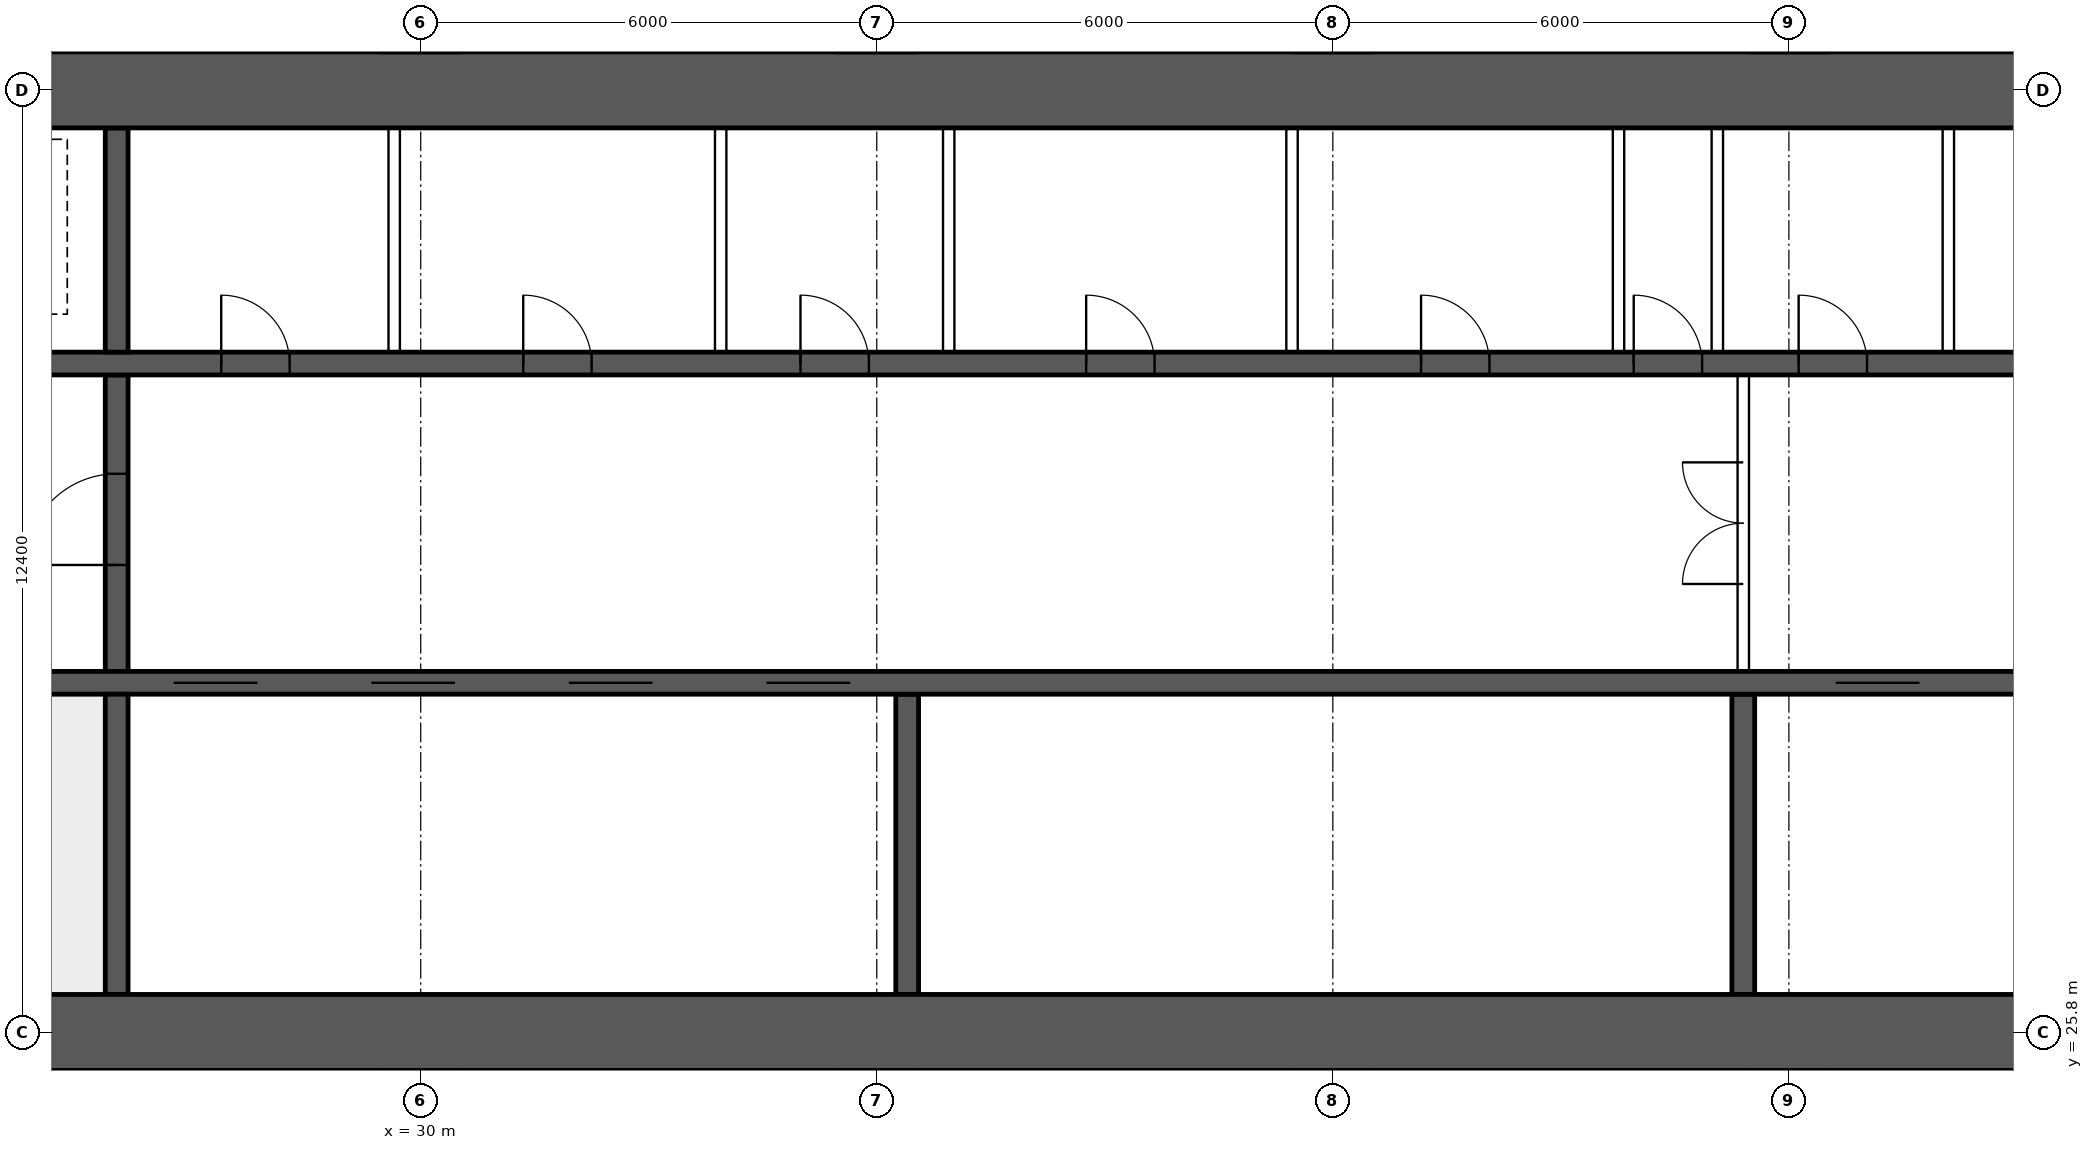
"""IFC4 building model, lengths in metres.
Left out: names, types, materials, properties, quantities, classifications, styles, units other than length and angle.
Written with IfcOpenShell. Run it as: python <this file> out.ifc"""

import sys

from ifc_helpers import new_model, si_unit, direction, frame, frame_2d, origin, place, context, subcontext, project, spatial, rectangle, extrude, element, fill, save


model = new_model("IFC4")
c1 = context("Model", 3, precision=1e-05, world=origin(), true_north=direction((0.0, 1.0)))
c2 = subcontext(c1, "Body", "Model", "MODEL_VIEW")
j1 = project(units=[si_unit("LENGTHUNIT", "METRE"), si_unit("PLANEANGLEUNIT", "RADIAN")], contexts=[c1])
p1 = place(None, origin())
s1 = spatial("IfcSite", under=j1, at=p1, CompositionType="ELEMENT")
p2 = place(p1, origin())
s2 = spatial("IfcBuilding", under=s1, at=p2, CompositionType="ELEMENT")
p3 = place(p2, frame((0.0, 0.0, 50.2)))
s3 = spatial("IfcBuildingStorey", under=s2, at=p3, CompositionType="ELEMENT", Elevation=50.2)
for number, where, z_axis, x_axis in (
    (1, (18.0, 25.8, 0.0), (0.0, 0.0, 1.0), (1.0, 0.0, 0.0)),
    (2, (18.0, 38.2, 0.0), (0.0, 0.0, 1.0), (1.0, 0.0, 0.0)),
):
    element("IfcWall", number, at=place(p3, frame(where, z_axis=z_axis, x_axis=x_axis)), inside=s3, PredefinedType="SHEAR", context=c2, shape_type="SweptSolid", body=[
        extrude(rectangle(XDim=48.0, YDim=1.0, at=frame_2d((24.0, 0.0))), origin(), (0.0, 0.0, 1.0), 3.75),
    ])
p4 = place(p3, frame((18.5, 30.4, 0.0), z_axis=(0.0, 0.0, 1.0), x_axis=(1.0, 0.0, 0.0)))
e3 = element("IfcWall", 3, at=p4, inside=s3, PredefinedType="SHEAR", context=c2, shape_type="SweptSolid", body=[
    extrude(rectangle(XDim=47.0, YDim=0.3, at=frame_2d((23.5, 0.0))), origin(), (0.0, 0.0, 1.0), 3.75),
])
p5 = place(p4, frame((0.4, 0.0, 0.0)))
e4 = element("IfcOpeningElement", 4, at=p5, cuts=e3, PredefinedType="OPENING", context=c2, shape_type="SweptSolid", body=[
    extrude(rectangle(XDim=1.0, YDim=2.1, at=frame_2d((0.5, 1.05))), frame((0.0, 0.16, 0.0), z_axis=(0.0, -1.0, 0.0), x_axis=(1.0, 0.0, 0.0)), (0.0, 0.0, 1.0), 0.32),
])
p6 = place(p4, frame((45.6, 0.0, 0.0)))
e5 = element("IfcOpeningElement", 5, at=p6, cuts=e3, PredefinedType="OPENING", context=c2, shape_type="SweptSolid", body=[
    extrude(rectangle(XDim=1.0, YDim=2.1, at=frame_2d((0.5, 1.05))), frame((0.0, 0.16, 0.0), z_axis=(0.0, -1.0, 0.0), x_axis=(1.0, 0.0, 0.0)), (0.0, 0.0, 1.0), 0.32),
])
p7 = place(p4, frame((8.25, 0.0, 0.0)))
e6 = element("IfcOpeningElement", 6, at=p7, cuts=e3, PredefinedType="OPENING", context=c2, shape_type="SweptSolid", body=[
    extrude(rectangle(XDim=1.1, YDim=2.1, at=frame_2d((0.55, 1.05))), frame((0.0, 0.16, 0.0), z_axis=(0.0, -1.0, 0.0), x_axis=(1.0, 0.0, 0.0)), (0.0, 0.0, 1.0), 0.32),
])
p8 = place(p4, frame((10.85, 0.0, 0.0)))
e7 = element("IfcOpeningElement", 7, at=p8, cuts=e3, PredefinedType="OPENING", context=c2, shape_type="SweptSolid", body=[
    extrude(rectangle(XDim=1.1, YDim=2.1, at=frame_2d((0.55, 1.05))), frame((0.0, 0.16, 0.0), z_axis=(0.0, -1.0, 0.0), x_axis=(1.0, 0.0, 0.0)), (0.0, 0.0, 1.0), 0.32),
])
p9 = place(p4, frame((13.45, 0.0, 0.0)))
e8 = element("IfcOpeningElement", 8, at=p9, cuts=e3, PredefinedType="OPENING", context=c2, shape_type="SweptSolid", body=[
    extrude(rectangle(XDim=1.1, YDim=2.1, at=frame_2d((0.55, 1.05))), frame((0.0, 0.16, 0.0), z_axis=(0.0, -1.0, 0.0), x_axis=(1.0, 0.0, 0.0)), (0.0, 0.0, 1.0), 0.32),
])
p10 = place(p4, frame((16.05, 0.0, 0.0)))
e9 = element("IfcOpeningElement", 9, at=p10, cuts=e3, PredefinedType="OPENING", context=c2, shape_type="SweptSolid", body=[
    extrude(rectangle(XDim=1.1, YDim=2.1, at=frame_2d((0.55, 1.05))), frame((0.0, 0.16, 0.0), z_axis=(0.0, -1.0, 0.0), x_axis=(1.0, 0.0, 0.0)), (0.0, 0.0, 1.0), 0.32),
])
p11 = place(p4, frame((30.117, 0.0, 0.0)))
e10 = element("IfcOpeningElement", 10, at=p11, cuts=e3, PredefinedType="OPENING", context=c2, shape_type="SweptSolid", body=[
    extrude(rectangle(XDim=1.1, YDim=2.1, at=frame_2d((0.55, 1.05))), frame((0.0, 0.16, 0.0), z_axis=(0.0, -1.0, 0.0), x_axis=(1.0, 0.0, 0.0)), (0.0, 0.0, 1.0), 0.32),
])
p12 = place(p4, frame((33.65, 0.0, 0.0)))
e11 = element("IfcOpeningElement", 11, at=p12, cuts=e3, PredefinedType="OPENING", context=c2, shape_type="SweptSolid", body=[
    extrude(rectangle(XDim=1.1, YDim=2.1, at=frame_2d((0.55, 1.05))), frame((0.0, 0.16, 0.0), z_axis=(0.0, -1.0, 0.0), x_axis=(1.0, 0.0, 0.0)), (0.0, 0.0, 1.0), 0.32),
])
p13 = place(p4, frame((37.183, 0.0, 0.0)))
e12 = element("IfcOpeningElement", 12, at=p13, cuts=e3, PredefinedType="OPENING", context=c2, shape_type="SweptSolid", body=[
    extrude(rectangle(XDim=1.1, YDim=2.1, at=frame_2d((0.55, 1.05))), frame((0.0, 0.16, 0.0), z_axis=(0.0, -1.0, 0.0), x_axis=(1.0, 0.0, 0.0)), (0.0, 0.0, 1.0), 0.32),
])
p14 = place(p3, frame((18.5, 34.6, 0.0), z_axis=(0.0, 0.0, 1.0), x_axis=(1.0, 0.0, 0.0)))
e13 = element("IfcWall", 13, at=p14, inside=s3, PredefinedType="SHEAR", context=c2, shape_type="SweptSolid", body=[
    extrude(rectangle(XDim=47.0, YDim=0.3, at=frame_2d((23.5, 0.0))), origin(), (0.0, 0.0, 1.0), 3.75),
])
p15 = place(p14, frame((0.9, 0.0, 0.0)))
e14 = element("IfcOpeningElement", 14, at=p15, cuts=e13, PredefinedType="OPENING", context=c2, shape_type="SweptSolid", body=[
    extrude(rectangle(XDim=1.1, YDim=2.1, at=frame_2d((0.55, 1.05))), frame((0.0, 0.16, 0.0), z_axis=(0.0, -1.0, 0.0), x_axis=(1.0, 0.0, 0.0)), (0.0, 0.0, 1.0), 0.32),
])
p16 = place(p14, frame((45.0, 0.0, 0.0)))
e15 = element("IfcOpeningElement", 15, at=p16, cuts=e13, PredefinedType="OPENING", context=c2, shape_type="SweptSolid", body=[
    extrude(rectangle(XDim=1.1, YDim=2.1, at=frame_2d((0.55, 1.05))), frame((0.0, 0.16, 0.0), z_axis=(0.0, -1.0, 0.0), x_axis=(1.0, 0.0, 0.0)), (0.0, 0.0, 1.0), 0.32),
])
p17 = place(p14, frame((4.1, 0.0, 0.0)))
e16 = element("IfcOpeningElement", 16, at=p17, cuts=e13, PredefinedType="OPENING", context=c2, shape_type="SweptSolid", body=[
    extrude(rectangle(XDim=0.9, YDim=2.1, at=frame_2d((0.45, 1.05))), frame((0.0, 0.16, 0.0), z_axis=(0.0, -1.0, 0.0), x_axis=(1.0, 0.0, 0.0)), (0.0, 0.0, 1.0), 0.32),
])
p18 = place(p14, frame((42.0, 0.0, 0.0)))
e17 = element("IfcOpeningElement", 17, at=p18, cuts=e13, PredefinedType="OPENING", context=c2, shape_type="SweptSolid", body=[
    extrude(rectangle(XDim=0.9, YDim=2.1, at=frame_2d((0.45, 1.05))), frame((0.0, 0.16, 0.0), z_axis=(0.0, -1.0, 0.0), x_axis=(1.0, 0.0, 0.0)), (0.0, 0.0, 1.0), 0.32),
])
p19 = place(p14, frame((8.875, 0.0, 0.0)))
e18 = element("IfcOpeningElement", 18, at=p19, cuts=e13, PredefinedType="OPENING", context=c2, shape_type="SweptSolid", body=[
    extrude(rectangle(XDim=0.9, YDim=2.1, at=frame_2d((0.45, 1.05))), frame((0.0, 0.16, 0.0), z_axis=(0.0, -1.0, 0.0), x_axis=(1.0, 0.0, 0.0)), (0.0, 0.0, 1.0), 0.32),
])
p20 = place(p14, frame((12.849, 0.0, 0.0)))
e19 = element("IfcOpeningElement", 19, at=p20, cuts=e13, PredefinedType="OPENING", context=c2, shape_type="SweptSolid", body=[
    extrude(rectangle(XDim=0.9, YDim=2.1, at=frame_2d((0.45, 1.05))), frame((0.0, 0.16, 0.0), z_axis=(0.0, -1.0, 0.0), x_axis=(1.0, 0.0, 0.0)), (0.0, 0.0, 1.0), 0.32),
])
p21 = place(p14, frame((16.496, 0.0, 0.0)))
e20 = element("IfcOpeningElement", 20, at=p21, cuts=e13, PredefinedType="OPENING", context=c2, shape_type="SweptSolid", body=[
    extrude(rectangle(XDim=0.9, YDim=2.1, at=frame_2d((0.45, 1.05))), frame((0.0, 0.16, 0.0), z_axis=(0.0, -1.0, 0.0), x_axis=(1.0, 0.0, 0.0)), (0.0, 0.0, 1.0), 0.32),
])
p22 = place(p14, frame((20.255, 0.0, 0.0)))
e21 = element("IfcOpeningElement", 21, at=p22, cuts=e13, PredefinedType="OPENING", context=c2, shape_type="SweptSolid", body=[
    extrude(rectangle(XDim=0.9, YDim=2.1, at=frame_2d((0.45, 1.05))), frame((0.0, 0.16, 0.0), z_axis=(0.0, -1.0, 0.0), x_axis=(1.0, 0.0, 0.0)), (0.0, 0.0, 1.0), 0.32),
])
p23 = place(p14, frame((24.661, 0.0, 0.0)))
e22 = element("IfcOpeningElement", 22, at=p23, cuts=e13, PredefinedType="OPENING", context=c2, shape_type="SweptSolid", body=[
    extrude(rectangle(XDim=0.9, YDim=2.1, at=frame_2d((0.45, 1.05))), frame((0.0, 0.16, 0.0), z_axis=(0.0, -1.0, 0.0), x_axis=(1.0, 0.0, 0.0)), (0.0, 0.0, 1.0), 0.32),
])
p24 = place(p14, frame((27.458, 0.0, 0.0)))
e23 = element("IfcOpeningElement", 23, at=p24, cuts=e13, PredefinedType="OPENING", context=c2, shape_type="SweptSolid", body=[
    extrude(rectangle(XDim=0.9, YDim=2.1, at=frame_2d((0.45, 1.05))), frame((0.0, 0.16, 0.0), z_axis=(0.0, -1.0, 0.0), x_axis=(1.0, 0.0, 0.0)), (0.0, 0.0, 1.0), 0.32),
])
p25 = place(p14, frame((29.628, 0.0, 0.0)))
e24 = element("IfcOpeningElement", 24, at=p25, cuts=e13, PredefinedType="OPENING", context=c2, shape_type="SweptSolid", body=[
    extrude(rectangle(XDim=0.9, YDim=2.1, at=frame_2d((0.45, 1.05))), frame((0.0, 0.16, 0.0), z_axis=(0.0, -1.0, 0.0), x_axis=(1.0, 0.0, 0.0)), (0.0, 0.0, 1.0), 0.32),
])
p26 = place(p14, frame((33.427, 0.0, 0.0)))
e25 = element("IfcOpeningElement", 25, at=p26, cuts=e13, PredefinedType="OPENING", context=c2, shape_type="SweptSolid", body=[
    extrude(rectangle(XDim=0.9, YDim=2.1, at=frame_2d((0.45, 1.05))), frame((0.0, 0.16, 0.0), z_axis=(0.0, -1.0, 0.0), x_axis=(1.0, 0.0, 0.0)), (0.0, 0.0, 1.0), 0.32),
])
p27 = place(p14, frame((37.378, 0.0, 0.0)))
e26 = element("IfcOpeningElement", 26, at=p27, cuts=e13, PredefinedType="OPENING", context=c2, shape_type="SweptSolid", body=[
    extrude(rectangle(XDim=0.9, YDim=2.1, at=frame_2d((0.45, 1.05))), frame((0.0, 0.16, 0.0), z_axis=(0.0, -1.0, 0.0), x_axis=(1.0, 0.0, 0.0)), (0.0, 0.0, 1.0), 0.32),
])
p28 = place(p3, frame((26.0, 26.3, 0.0), z_axis=(0.0, 0.0, 1.0), x_axis=(0.0, 1.0, 0.0)))
e27 = element("IfcWall", 27, at=p28, inside=s3, PredefinedType="SHEAR", context=c2, shape_type="SweptSolid", body=[
    extrude(rectangle(XDim=3.95, YDim=0.3, at=frame_2d((1.975, 0.0))), origin(), (0.0, 0.0, 1.0), 3.75),
])
p29 = place(p3, frame((26.0, 30.55, 0.0), z_axis=(0.0, 0.0, 1.0), x_axis=(0.0, 1.0, 0.0)))
e28 = element("IfcWall", 28, at=p29, inside=s3, PredefinedType="SHEAR", context=c2, shape_type="SweptSolid", body=[
    extrude(rectangle(XDim=3.9, YDim=0.3, at=frame_2d((1.95, 0.0))), origin(), (0.0, 0.0, 1.0), 3.75),
])
p30 = place(p29, frame((1.4, 0.0, 0.0)))
e29 = element("IfcOpeningElement", 29, at=p30, cuts=e28, PredefinedType="OPENING", context=c2, shape_type="SweptSolid", body=[
    extrude(rectangle(XDim=1.2, YDim=2.1, at=frame_2d((0.6, 1.05))), frame((0.0, 0.16, 0.0), z_axis=(0.0, -1.0, 0.0), x_axis=(1.0, 0.0, 0.0)), (0.0, 0.0, 1.0), 0.32),
])
p31 = place(p3, frame((26.0, 34.75, 0.0), z_axis=(0.0, 0.0, 1.0), x_axis=(0.0, 1.0, 0.0)))
e30 = element("IfcWall", 30, at=p31, inside=s3, PredefinedType="SHEAR", context=c2, shape_type="SweptSolid", body=[
    extrude(rectangle(XDim=2.95, YDim=0.3, at=frame_2d((1.475, 0.0))), origin(), (0.0, 0.0, 1.0), 3.75),
])
for number, where, z_axis, x_axis in (
    (31, (36.4, 26.3, 0.0), (0.0, 0.0, 1.0), (0.0, 1.0, 0.0)),
    (32, (47.4, 26.3, 0.0), (0.0, 0.0, 1.0), (0.0, 1.0, 0.0)),
):
    element("IfcWall", number, at=place(p3, frame(where, z_axis=z_axis, x_axis=x_axis)), inside=s3, PredefinedType="SHEAR", context=c2, shape_type="SweptSolid", body=[
        extrude(rectangle(XDim=3.95, YDim=0.3, at=frame_2d((1.975, 0.0))), origin(), (0.0, 0.0, 1.0), 3.75),
    ])
p32 = place(p3, frame((47.4, 30.55, 0.0), z_axis=(0.0, 0.0, 1.0), x_axis=(0.0, 1.0, 0.0)))
e33 = element("IfcWall", 33, at=p32, inside=s3, PredefinedType="SOLIDWALL", context=c2, shape_type="SweptSolid", body=[
    extrude(rectangle(XDim=3.9, YDim=0.15, at=frame_2d((1.95, 0.0))), origin(), (0.0, 0.0, 1.0), 3.3),
])
p33 = place(p32, frame((1.15, 0.0, 0.0)))
e34 = element("IfcOpeningElement", 34, at=p33, cuts=e33, PredefinedType="OPENING", context=c2, shape_type="SweptSolid", body=[
    extrude(rectangle(XDim=1.6, YDim=2.1, at=frame_2d((0.8, 1.05))), frame((0.0, 0.085, 0.0), z_axis=(0.0, -1.0, 0.0), x_axis=(1.0, 0.0, 0.0)), (0.0, 0.0, 1.0), 0.17),
])
for number, where, z_axis, x_axis in (
    (35, (29.651, 34.75, 0.0), (0.0, 0.0, 1.0), (0.0, 1.0, 0.0)),
    (36, (33.946, 34.75, 0.0), (0.0, 0.0, 1.0), (0.0, 1.0, 0.0)),
    (37, (36.946, 34.75, 0.0), (0.0, 0.0, 1.0), (0.0, 1.0, 0.0)),
    (38, (41.463, 34.75, 0.0), (0.0, 0.0, 1.0), (0.0, 1.0, 0.0)),
    (39, (45.758, 34.75, 0.0), (0.0, 0.0, 1.0), (0.0, 1.0, 0.0)),
    (40, (47.058, 34.75, 0.0), (0.0, 0.0, 1.0), (0.0, 1.0, 0.0)),
    (41, (50.098, 34.75, 0.0), (0.0, 0.0, 1.0), (0.0, 1.0, 0.0)),
):
    element("IfcWall", number, at=place(p3, frame(where, z_axis=z_axis, x_axis=x_axis)), inside=s3, PredefinedType="SOLIDWALL", context=c2, shape_type="SweptSolid", body=[
        extrude(rectangle(XDim=2.95, YDim=0.15, at=frame_2d((1.475, 0.0))), origin(), (0.0, 0.0, 1.0), 3.3),
    ])
for number, where, z_axis, x_axis in (
    (42, (26.815, 14.9, 0.0), (0.0, 0.0, 1.0), (0.0, 1.0, 0.0)),
    (43, (32.83, 14.9, 0.0), (0.0, 0.0, 1.0), (0.0, 1.0, 0.0)),
    (44, (39.31, 14.9, 0.0), (0.0, 0.0, 1.0), (0.0, 1.0, 0.0)),
    (45, (45.48, 14.9, 0.0), (0.0, 0.0, 1.0), (0.0, 1.0, 0.0)),
):
    element("IfcWall", number, at=place(p3, frame(where, z_axis=z_axis, x_axis=x_axis)), inside=s3, PredefinedType="PARTITIONING", context=c2, shape_type="SweptSolid", body=[
        extrude(rectangle(XDim=10.4, YDim=0.15, at=frame_2d((5.2, 0.0))), origin(), (0.0, 0.0, 1.0), 3.3),
    ])
p34 = place(p33, origin())
e46 = element("IfcDoor", 46, at=p34, inside=s3, OperationType="DOUBLE_DOOR_SINGLE_SWING", PredefinedType="DOOR", context=c2, shape_type="SweptSolid", body=[
    extrude(rectangle(XDim=1.6, YDim=2.1, at=frame_2d((0.8, 1.05))), frame((0.0, 0.025, 0.0), z_axis=(0.0, -1.0, 0.0), x_axis=(1.0, 0.0, 0.0)), (0.0, 0.0, 1.0), 0.05),
])
fill(e34, e46)
p35 = place(p30, origin())
e47 = element("IfcDoor", 47, at=p35, inside=s3, OperationType="SINGLE_SWING_LEFT", PredefinedType="DOOR", context=c2, shape_type="SweptSolid", body=[
    extrude(rectangle(XDim=1.2, YDim=2.1, at=frame_2d((0.6, 1.05))), frame((0.0, 0.025, 0.0), z_axis=(0.0, -1.0, 0.0), x_axis=(1.0, 0.0, 0.0)), (0.0, 0.0, 1.0), 0.05),
])
fill(e29, e47)
p36 = place(p19, origin())
e48 = element("IfcDoor", 48, at=p36, inside=s3, OperationType="SINGLE_SWING_LEFT", PredefinedType="DOOR", context=c2, shape_type="SweptSolid", body=[
    extrude(rectangle(XDim=0.9, YDim=2.1, at=frame_2d((0.45, 1.05))), frame((0.0, 0.025, 0.0), z_axis=(0.0, -1.0, 0.0), x_axis=(1.0, 0.0, 0.0)), (0.0, 0.0, 1.0), 0.05),
])
fill(e18, e48)
p37 = place(p20, origin())
e49 = element("IfcDoor", 49, at=p37, inside=s3, OperationType="SINGLE_SWING_LEFT", PredefinedType="DOOR", context=c2, shape_type="SweptSolid", body=[
    extrude(rectangle(XDim=0.9, YDim=2.1, at=frame_2d((0.45, 1.05))), frame((0.0, 0.025, 0.0), z_axis=(0.0, -1.0, 0.0), x_axis=(1.0, 0.0, 0.0)), (0.0, 0.0, 1.0), 0.05),
])
fill(e19, e49)
p38 = place(p21, origin())
e50 = element("IfcDoor", 50, at=p38, inside=s3, OperationType="SINGLE_SWING_LEFT", PredefinedType="DOOR", context=c2, shape_type="SweptSolid", body=[
    extrude(rectangle(XDim=0.9, YDim=2.1, at=frame_2d((0.45, 1.05))), frame((0.0, 0.025, 0.0), z_axis=(0.0, -1.0, 0.0), x_axis=(1.0, 0.0, 0.0)), (0.0, 0.0, 1.0), 0.05),
])
fill(e20, e50)
p39 = place(p22, origin())
e51 = element("IfcDoor", 51, at=p39, inside=s3, OperationType="SINGLE_SWING_LEFT", PredefinedType="DOOR", context=c2, shape_type="SweptSolid", body=[
    extrude(rectangle(XDim=0.9, YDim=2.1, at=frame_2d((0.45, 1.05))), frame((0.0, 0.025, 0.0), z_axis=(0.0, -1.0, 0.0), x_axis=(1.0, 0.0, 0.0)), (0.0, 0.0, 1.0), 0.05),
])
fill(e21, e51)
p40 = place(p23, origin())
e52 = element("IfcDoor", 52, at=p40, inside=s3, OperationType="SINGLE_SWING_LEFT", PredefinedType="DOOR", context=c2, shape_type="SweptSolid", body=[
    extrude(rectangle(XDim=0.9, YDim=2.1, at=frame_2d((0.45, 1.05))), frame((0.0, 0.025, 0.0), z_axis=(0.0, -1.0, 0.0), x_axis=(1.0, 0.0, 0.0)), (0.0, 0.0, 1.0), 0.05),
])
fill(e22, e52)
p41 = place(p24, origin())
e53 = element("IfcDoor", 53, at=p41, inside=s3, OperationType="SINGLE_SWING_LEFT", PredefinedType="DOOR", context=c2, shape_type="SweptSolid", body=[
    extrude(rectangle(XDim=0.9, YDim=2.1, at=frame_2d((0.45, 1.05))), frame((0.0, 0.025, 0.0), z_axis=(0.0, -1.0, 0.0), x_axis=(1.0, 0.0, 0.0)), (0.0, 0.0, 1.0), 0.05),
])
fill(e23, e53)
p42 = place(p25, origin())
e54 = element("IfcDoor", 54, at=p42, inside=s3, OperationType="SINGLE_SWING_LEFT", PredefinedType="DOOR", context=c2, shape_type="SweptSolid", body=[
    extrude(rectangle(XDim=0.9, YDim=2.1, at=frame_2d((0.45, 1.05))), frame((0.0, 0.025, 0.0), z_axis=(0.0, -1.0, 0.0), x_axis=(1.0, 0.0, 0.0)), (0.0, 0.0, 1.0), 0.05),
])
fill(e24, e54)
p43 = place(p7, origin())
e55 = element("IfcDoor", 55, at=p43, inside=s3, OperationType="DOUBLE_DOOR_SLIDING", PredefinedType="DOOR", context=c2, shape_type="SweptSolid", body=[
    extrude(rectangle(XDim=1.1, YDim=2.1, at=frame_2d((0.55, 1.05))), frame((0.0, 0.025, 0.0), z_axis=(0.0, -1.0, 0.0), x_axis=(1.0, 0.0, 0.0)), (0.0, 0.0, 1.0), 0.05),
])
fill(e6, e55)
p44 = place(p8, origin())
e56 = element("IfcDoor", 56, at=p44, inside=s3, OperationType="DOUBLE_DOOR_SLIDING", PredefinedType="DOOR", context=c2, shape_type="SweptSolid", body=[
    extrude(rectangle(XDim=1.1, YDim=2.1, at=frame_2d((0.55, 1.05))), frame((0.0, 0.025, 0.0), z_axis=(0.0, -1.0, 0.0), x_axis=(1.0, 0.0, 0.0)), (0.0, 0.0, 1.0), 0.05),
])
fill(e7, e56)
p45 = place(p9, origin())
e57 = element("IfcDoor", 57, at=p45, inside=s3, OperationType="DOUBLE_DOOR_SLIDING", PredefinedType="DOOR", context=c2, shape_type="SweptSolid", body=[
    extrude(rectangle(XDim=1.1, YDim=2.1, at=frame_2d((0.55, 1.05))), frame((0.0, 0.025, 0.0), z_axis=(0.0, -1.0, 0.0), x_axis=(1.0, 0.0, 0.0)), (0.0, 0.0, 1.0), 0.05),
])
fill(e8, e57)
p46 = place(p10, origin())
e58 = element("IfcDoor", 58, at=p46, inside=s3, OperationType="DOUBLE_DOOR_SLIDING", PredefinedType="DOOR", context=c2, shape_type="SweptSolid", body=[
    extrude(rectangle(XDim=1.1, YDim=2.1, at=frame_2d((0.55, 1.05))), frame((0.0, 0.025, 0.0), z_axis=(0.0, -1.0, 0.0), x_axis=(1.0, 0.0, 0.0)), (0.0, 0.0, 1.0), 0.05),
])
fill(e9, e58)
p47 = place(p11, origin())
e59 = element("IfcDoor", 59, at=p47, inside=s3, OperationType="DOUBLE_DOOR_SLIDING", PredefinedType="DOOR", context=c2, shape_type="SweptSolid", body=[
    extrude(rectangle(XDim=1.1, YDim=2.1, at=frame_2d((0.55, 1.05))), frame((0.0, 0.025, 0.0), z_axis=(0.0, -1.0, 0.0), x_axis=(1.0, 0.0, 0.0)), (0.0, 0.0, 1.0), 0.05),
])
fill(e10, e59)
save(model, sys.argv[1])
